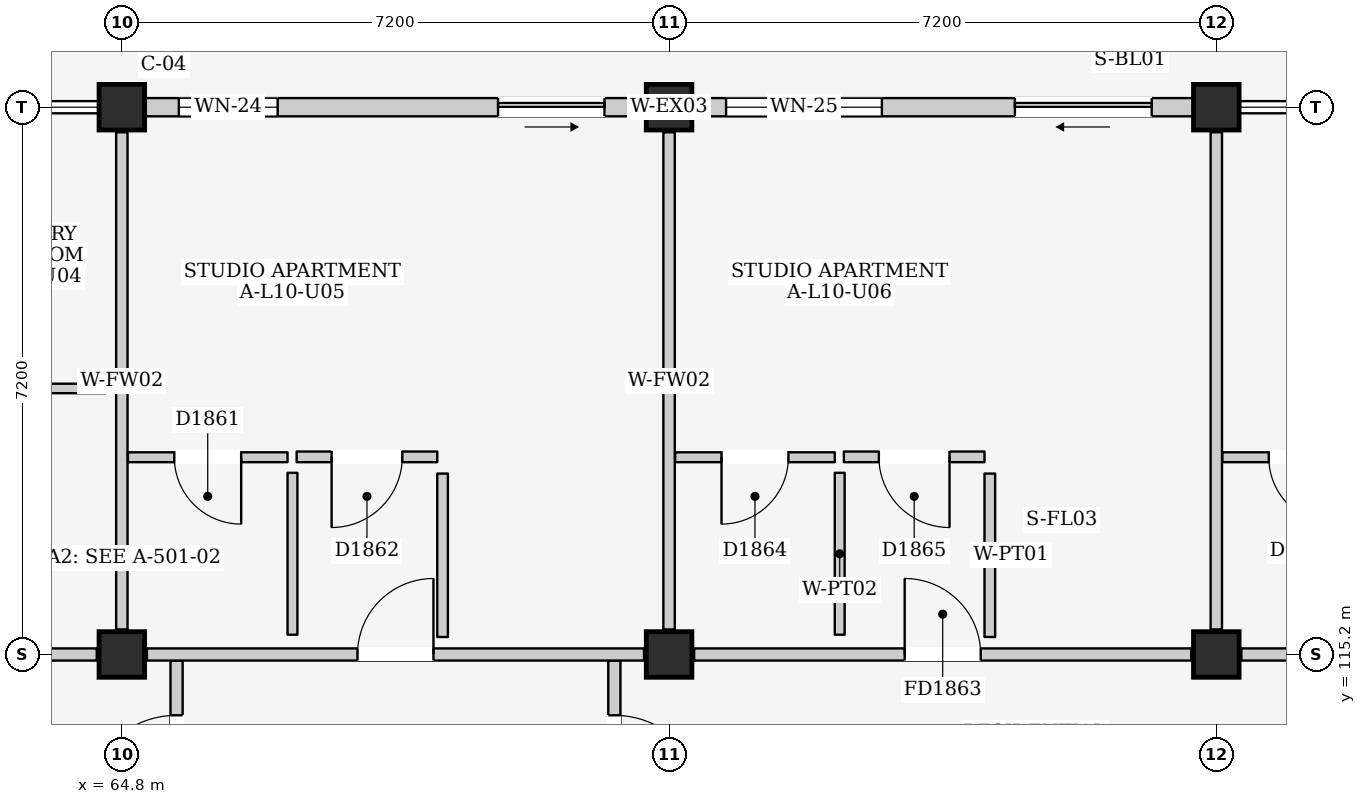
"""IFC4 building model, lengths in metres.
Left out: names, types, materials, properties, quantities, classifications, styles, units other than length and angle.
Written with IfcOpenShell. Run it as: python <this file> out.ifc"""

import sys

from ifc_helpers import new_model, si_unit, direction, frame, frame_2d, origin, origin_2d, place, context, subcontext, project, spatial, rectangle, extrude, element, fill, save


model = new_model("IFC4")
c1 = context("Model", 3, precision=1e-05, world=origin(), true_north=direction((0.0, 1.0)))
c2 = subcontext(c1, "Body", "Model", "MODEL_VIEW")
j1 = project(units=[si_unit("LENGTHUNIT", "METRE"), si_unit("PLANEANGLEUNIT", "RADIAN")], contexts=[c1])
p1 = place(None, origin())
s1 = spatial("IfcSite", under=j1, at=p1, CompositionType="ELEMENT")
p2 = place(p1, origin())
s2 = spatial("IfcBuilding", under=s1, at=p2, CompositionType="ELEMENT")
p3 = place(p2, frame((0.0, 0.0, 34.8)))
s3 = spatial("IfcBuildingStorey", under=s2, at=p3, CompositionType="ELEMENT", Elevation=34.8)
for number, where, z_axis, x_axis in (
    (1, (64.8, 115.2, 0.0), (0.0, 0.0, 1.0), (1.0, 0.0, 0.0)),
    (2, (64.8, 122.4, 0.0), (0.0, 0.0, 1.0), (1.0, 0.0, 0.0)),
    (3, (72.0, 115.2, 0.0), (0.0, 0.0, 1.0), (1.0, 0.0, 0.0)),
    (4, (72.0, 122.4, 0.0), (0.0, 0.0, 1.0), (1.0, 0.0, 0.0)),
    (5, (79.2, 115.2, 0.0), (0.0, 0.0, 1.0), (1.0, 0.0, 0.0)),
    (6, (79.2, 122.4, 0.0), (0.0, 0.0, 1.0), (1.0, 0.0, 0.0)),
):
    element("IfcColumn", number, at=place(p3, frame(where, z_axis=z_axis, x_axis=x_axis)), inside=s3, PredefinedType="COLUMN", context=c2, shape_type="SweptSolid", body=[
        extrude(rectangle(XDim=0.6, YDim=0.6, at=origin_2d()), origin(), (0.0, 0.0, 1.0), 3.2),
    ])
p4 = place(p3, frame((65.1, 122.4, 0.0), z_axis=(0.0, 0.0, 1.0), x_axis=(1.0, 0.0, 0.0)))
e7 = element("IfcWall", 7, at=p4, inside=s3, PredefinedType="ELEMENTEDWALL", context=c2, shape_type="SweptSolid", body=[
    extrude(rectangle(XDim=6.6, YDim=0.24, at=frame_2d((3.3, 0.0))), origin(), (0.0, 0.0, 1.0), 2.495),
])
p5 = place(p4, frame((4.65, 0.0, 0.0)))
e8 = element("IfcOpeningElement", 8, at=p5, cuts=e7, PredefinedType="OPENING", context=c2, shape_type="SweptSolid", body=[
    extrude(rectangle(XDim=1.4, YDim=2.1, at=frame_2d((0.7, 1.05))), frame((0.0, 0.135, 0.0), z_axis=(0.0, -1.0, 0.0), x_axis=(1.0, 0.0, 0.0)), (0.0, 0.0, 1.0), 0.27),
])
p6 = place(p4, frame((0.45, 0.0, 0.9)))
e9 = element("IfcOpeningElement", 9, at=p6, cuts=e7, PredefinedType="OPENING", context=c2, shape_type="SweptSolid", body=[
    extrude(rectangle(XDim=1.3, YDim=1.25, at=frame_2d((0.65, 0.625))), frame((0.0, 0.135, 0.0), z_axis=(0.0, -1.0, 0.0), x_axis=(1.0, 0.0, 0.0)), (0.0, 0.0, 1.0), 0.27),
])
p7 = place(p3, frame((72.3, 122.4, 0.0), z_axis=(0.0, 0.0, 1.0), x_axis=(1.0, 0.0, 0.0)))
e10 = element("IfcWall", 10, at=p7, inside=s3, PredefinedType="ELEMENTEDWALL", context=c2, shape_type="SweptSolid", body=[
    extrude(rectangle(XDim=6.6, YDim=0.24, at=frame_2d((3.3, 0.0))), origin(), (0.0, 0.0, 1.0), 2.495),
])
p8 = place(p7, frame((4.25, 0.0, 0.0)))
e11 = element("IfcOpeningElement", 11, at=p8, cuts=e10, PredefinedType="OPENING", context=c2, shape_type="SweptSolid", body=[
    extrude(rectangle(XDim=1.8, YDim=2.12, at=frame_2d((0.9, 1.06))), frame((0.0, 0.135, 0.0), z_axis=(0.0, -1.0, 0.0), x_axis=(1.0, 0.0, 0.0)), (0.0, 0.0, 1.0), 0.27),
])
p9 = place(p7, frame((0.45, 0.0, 0.785)))
e12 = element("IfcOpeningElement", 12, at=p9, cuts=e10, PredefinedType="OPENING", context=c2, shape_type="SweptSolid", body=[
    extrude(rectangle(XDim=2.05, YDim=1.6, at=frame_2d((1.025, 0.8))), frame((0.0, 0.135, 0.0), z_axis=(0.0, -1.0, 0.0), x_axis=(1.0, 0.0, 0.0)), (0.0, 0.0, 1.0), 0.27),
])
p10 = place(p3, frame((65.52, 110.8, 0.0), z_axis=(0.0, 0.0, 1.0), x_axis=(0.0, 1.0, 0.0)))
e13 = element("IfcWall", 13, at=p10, inside=s3, PredefinedType="PARTITIONING", context=c2, shape_type="SweptSolid", body=[
    extrude(rectangle(XDim=4.32, YDim=0.16, at=frame_2d((2.16, 0.0))), origin(), (0.0, 0.0, 1.0), 2.96),
])
p11 = place(p10, frame((2.4, 0.0, 0.0)))
e14 = element("IfcOpeningElement", 14, at=p11, cuts=e13, PredefinedType="OPENING", context=c2, shape_type="SweptSolid", body=[
    extrude(rectangle(XDim=1.2, YDim=2.2, at=frame_2d((0.6, 1.1))), frame((0.0, 0.095, 0.0), z_axis=(0.0, -1.0, 0.0), x_axis=(1.0, 0.0, 0.0)), (0.0, 0.0, 1.0), 0.19),
])
p12 = place(p3, frame((71.28, 110.8, 0.0), z_axis=(0.0, 0.0, 1.0), x_axis=(0.0, 1.0, 0.0)))
e15 = element("IfcWall", 15, at=p12, inside=s3, PredefinedType="PARTITIONING", context=c2, shape_type="SweptSolid", body=[
    extrude(rectangle(XDim=4.32, YDim=0.16, at=frame_2d((2.16, 0.0))), origin(), (0.0, 0.0, 1.0), 2.96),
])
p13 = place(p12, frame((2.4, 0.0, 0.0)))
e16 = element("IfcOpeningElement", 16, at=p13, cuts=e15, PredefinedType="OPENING", context=c2, shape_type="SweptSolid", body=[
    extrude(rectangle(XDim=1.2, YDim=2.2, at=frame_2d((0.6, 1.1))), frame((0.0, 0.095, 0.0), z_axis=(0.0, -1.0, 0.0), x_axis=(1.0, 0.0, 0.0)), (0.0, 0.0, 1.0), 0.19),
])
p14 = place(p3, frame((57.93, 115.2, 0.0), z_axis=(0.0, 0.0, 1.0), x_axis=(1.0, 0.0, 0.0)))
e17 = element("IfcWall", 17, at=p14, inside=s3, PredefinedType="PARTITIONING", context=c2, shape_type="SweptSolid", body=[
    extrude(rectangle(XDim=6.54, YDim=0.16, at=frame_2d((3.27, 0.0))), origin(), (0.0, 0.0, 1.0), 2.295),
])
p15 = place(p14, frame((2.77, 0.0, 0.0)))
e18 = element("IfcOpeningElement", 18, at=p15, cuts=e17, PredefinedType="OPENING", context=c2, shape_type="SweptSolid", body=[
    extrude(rectangle(XDim=1.0, YDim=2.15, at=frame_2d((0.5, 1.075))), frame((0.0, 0.095, 0.0), z_axis=(0.0, -1.0, 0.0), x_axis=(1.0, 0.0, 0.0)), (0.0, 0.0, 1.0), 0.19),
])
p16 = place(p3, frame((64.8, 115.53, 0.0), z_axis=(0.0, 0.0, 1.0), x_axis=(0.0, 1.0, 0.0)))
e19 = element("IfcWall", 19, at=p16, inside=s3, PredefinedType="PARTITIONING", context=c2, shape_type="SweptSolid", body=[
    extrude(rectangle(XDim=6.54, YDim=0.15, at=frame_2d((3.27, 0.0))), origin(), (0.0, 0.0, 1.0), 2.445),
])
p17 = place(p3, frame((61.52, 118.7, 0.0), z_axis=(0.0, 0.0, 1.0), x_axis=(1.0, 0.0, 0.0)))
e20 = element("IfcWall", 20, at=p17, inside=s3, PredefinedType="PARTITIONING", context=c2, shape_type="SweptSolid", body=[
    extrude(rectangle(XDim=3.06, YDim=0.125, at=frame_2d((1.53, 0.0))), origin(), (0.0, 0.0, 1.0), 2.96),
])
p18 = place(p3, frame((65.13, 115.2, 0.0), z_axis=(0.0, 0.0, 1.0), x_axis=(1.0, 0.0, 0.0)))
e21 = element("IfcWall", 21, at=p18, inside=s3, PredefinedType="PARTITIONING", context=c2, shape_type="SweptSolid", body=[
    extrude(rectangle(XDim=6.54, YDim=0.16, at=frame_2d((3.27, 0.0))), origin(), (0.0, 0.0, 1.0), 2.295),
])
p19 = place(p18, frame((2.77, 0.0, 0.0)))
e22 = element("IfcOpeningElement", 22, at=p19, cuts=e21, PredefinedType="OPENING", context=c2, shape_type="SweptSolid", body=[
    extrude(rectangle(XDim=1.0, YDim=2.15, at=frame_2d((0.5, 1.075))), frame((0.0, 0.095, 0.0), z_axis=(0.0, -1.0, 0.0), x_axis=(1.0, 0.0, 0.0)), (0.0, 0.0, 1.0), 0.19),
])
p20 = place(p3, frame((72.0, 115.53, 0.0), z_axis=(0.0, 0.0, 1.0), x_axis=(0.0, 1.0, 0.0)))
e23 = element("IfcWall", 23, at=p20, inside=s3, PredefinedType="PARTITIONING", context=c2, shape_type="SweptSolid", body=[
    extrude(rectangle(XDim=6.54, YDim=0.15, at=frame_2d((3.27, 0.0))), origin(), (0.0, 0.0, 1.0), 2.445),
])
p21 = place(p3, frame((64.88, 117.795, 0.0), z_axis=(0.0, 0.0, 1.0), x_axis=(1.0, 0.0, 0.0)))
e24 = element("IfcWall", 24, at=p21, inside=s3, PredefinedType="PARTITIONING", context=c2, shape_type="SweptSolid", body=[
    extrude(rectangle(XDim=2.1, YDim=0.13, at=frame_2d((1.05, 0.0))), origin(), (0.0, 0.0, 1.0), 2.96),
])
p22 = place(p21, frame((0.61, 0.0, 0.0)))
e25 = element("IfcOpeningElement", 25, at=p22, cuts=e24, PredefinedType="OPENING", context=c2, shape_type="SweptSolid", body=[
    extrude(rectangle(XDim=0.88, YDim=2.1, at=frame_2d((0.44, 1.05))), frame((0.0, 0.08, 0.0), z_axis=(0.0, -1.0, 0.0), x_axis=(1.0, 0.0, 0.0)), (0.0, 0.0, 1.0), 0.16),
])
p23 = place(p3, frame((67.045, 115.46, 0.0), z_axis=(0.0, 0.0, 1.0), x_axis=(0.0, 1.0, 0.0)))
e26 = element("IfcWall", 26, at=p23, inside=s3, PredefinedType="PARTITIONING", context=c2, shape_type="SweptSolid", body=[
    extrude(rectangle(XDim=2.13, YDim=0.13, at=frame_2d((1.065, 0.0))), origin(), (0.0, 0.0, 1.0), 2.96),
])
p24 = place(p3, frame((67.1, 117.8, 0.0), z_axis=(0.0, 0.0, 1.0), x_axis=(1.0, 0.0, 0.0)))
e27 = element("IfcWall", 27, at=p24, inside=s3, PredefinedType="PARTITIONING", context=c2, shape_type="SweptSolid", body=[
    extrude(rectangle(XDim=1.85, YDim=0.14, at=frame_2d((0.925, 0.0))), origin(), (0.0, 0.0, 1.0), 2.96),
])
p25 = place(p24, frame((0.46, 0.0, 0.0)))
e28 = element("IfcOpeningElement", 28, at=p25, cuts=e27, PredefinedType="OPENING", context=c2, shape_type="SweptSolid", body=[
    extrude(rectangle(XDim=0.93, YDim=2.14, at=frame_2d((0.465, 1.07))), frame((0.0, 0.085, 0.0), z_axis=(0.0, -1.0, 0.0), x_axis=(1.0, 0.0, 0.0)), (0.0, 0.0, 1.0), 0.17),
])
p26 = place(p3, frame((69.02, 115.43, 0.0), z_axis=(0.0, 0.0, 1.0), x_axis=(0.0, 1.0, 0.0)))
e29 = element("IfcWall", 29, at=p26, inside=s3, PredefinedType="PARTITIONING", context=c2, shape_type="SweptSolid", body=[
    extrude(rectangle(XDim=2.15, YDim=0.14, at=frame_2d((1.075, 0.0))), origin(), (0.0, 0.0, 1.0), 2.96),
])
p27 = place(p3, frame((72.33, 115.2, 0.0), z_axis=(0.0, 0.0, 1.0), x_axis=(1.0, 0.0, 0.0)))
e30 = element("IfcWall", 30, at=p27, inside=s3, PredefinedType="PARTITIONING", context=c2, shape_type="SweptSolid", body=[
    extrude(rectangle(XDim=6.54, YDim=0.16, at=frame_2d((3.27, 0.0))), origin(), (0.0, 0.0, 1.0), 2.295),
])
p28 = place(p27, frame((2.77, 0.0, 0.0)))
e31 = element("IfcOpeningElement", 31, at=p28, cuts=e30, PredefinedType="OPENING", context=c2, shape_type="SweptSolid", body=[
    extrude(rectangle(XDim=1.0, YDim=2.15, at=frame_2d((0.5, 1.075))), frame((0.0, 0.095, 0.0), z_axis=(0.0, -1.0, 0.0), x_axis=(1.0, 0.0, 0.0)), (0.0, 0.0, 1.0), 0.19),
])
p29 = place(p3, frame((79.2, 115.53, 0.0), z_axis=(0.0, 0.0, 1.0), x_axis=(0.0, 1.0, 0.0)))
e32 = element("IfcWall", 32, at=p29, inside=s3, PredefinedType="PARTITIONING", context=c2, shape_type="SweptSolid", body=[
    extrude(rectangle(XDim=6.54, YDim=0.15, at=frame_2d((3.27, 0.0))), origin(), (0.0, 0.0, 1.0), 2.445),
])
p30 = place(p3, frame((72.08, 117.795, 0.0), z_axis=(0.0, 0.0, 1.0), x_axis=(1.0, 0.0, 0.0)))
e33 = element("IfcWall", 33, at=p30, inside=s3, PredefinedType="PARTITIONING", context=c2, shape_type="SweptSolid", body=[
    extrude(rectangle(XDim=2.1, YDim=0.13, at=frame_2d((1.05, 0.0))), origin(), (0.0, 0.0, 1.0), 2.96),
])
p31 = place(p30, frame((0.61, 0.0, 0.0)))
e34 = element("IfcOpeningElement", 34, at=p31, cuts=e33, PredefinedType="OPENING", context=c2, shape_type="SweptSolid", body=[
    extrude(rectangle(XDim=0.88, YDim=2.1, at=frame_2d((0.44, 1.05))), frame((0.0, 0.08, 0.0), z_axis=(0.0, -1.0, 0.0), x_axis=(1.0, 0.0, 0.0)), (0.0, 0.0, 1.0), 0.16),
])
p32 = place(p3, frame((74.245, 115.46, 0.0), z_axis=(0.0, 0.0, 1.0), x_axis=(0.0, 1.0, 0.0)))
e35 = element("IfcWall", 35, at=p32, inside=s3, PredefinedType="PARTITIONING", context=c2, shape_type="SweptSolid", body=[
    extrude(rectangle(XDim=2.13, YDim=0.13, at=frame_2d((1.065, 0.0))), origin(), (0.0, 0.0, 1.0), 2.96),
])
p33 = place(p3, frame((74.3, 117.8, 0.0), z_axis=(0.0, 0.0, 1.0), x_axis=(1.0, 0.0, 0.0)))
e36 = element("IfcWall", 36, at=p33, inside=s3, PredefinedType="PARTITIONING", context=c2, shape_type="SweptSolid", body=[
    extrude(rectangle(XDim=1.85, YDim=0.14, at=frame_2d((0.925, 0.0))), origin(), (0.0, 0.0, 1.0), 2.96),
])
p34 = place(p33, frame((0.46, 0.0, 0.0)))
e37 = element("IfcOpeningElement", 37, at=p34, cuts=e36, PredefinedType="OPENING", context=c2, shape_type="SweptSolid", body=[
    extrude(rectangle(XDim=0.93, YDim=2.14, at=frame_2d((0.465, 1.07))), frame((0.0, 0.085, 0.0), z_axis=(0.0, -1.0, 0.0), x_axis=(1.0, 0.0, 0.0)), (0.0, 0.0, 1.0), 0.17),
])
p35 = place(p3, frame((76.22, 115.43, 0.0), z_axis=(0.0, 0.0, 1.0), x_axis=(0.0, 1.0, 0.0)))
e38 = element("IfcWall", 38, at=p35, inside=s3, PredefinedType="PARTITIONING", context=c2, shape_type="SweptSolid", body=[
    extrude(rectangle(XDim=2.15, YDim=0.14, at=frame_2d((1.075, 0.0))), origin(), (0.0, 0.0, 1.0), 2.96),
])
p36 = place(p3, frame((79.53, 115.2, 0.0), z_axis=(0.0, 0.0, 1.0), x_axis=(1.0, 0.0, 0.0)))
e39 = element("IfcWall", 39, at=p36, inside=s3, PredefinedType="PARTITIONING", context=c2, shape_type="SweptSolid", body=[
    extrude(rectangle(XDim=6.54, YDim=0.16, at=frame_2d((3.27, 0.0))), origin(), (0.0, 0.0, 1.0), 2.295),
])
p37 = place(p36, frame((2.77, 0.0, 0.0)))
e40 = element("IfcOpeningElement", 40, at=p37, cuts=e39, PredefinedType="OPENING", context=c2, shape_type="SweptSolid", body=[
    extrude(rectangle(XDim=1.0, YDim=2.15, at=frame_2d((0.5, 1.075))), frame((0.0, 0.095, 0.0), z_axis=(0.0, -1.0, 0.0), x_axis=(1.0, 0.0, 0.0)), (0.0, 0.0, 1.0), 0.19),
])
p38 = place(p3, frame((79.28, 117.795, 0.0), z_axis=(0.0, 0.0, 1.0), x_axis=(1.0, 0.0, 0.0)))
e41 = element("IfcWall", 41, at=p38, inside=s3, PredefinedType="PARTITIONING", context=c2, shape_type="SweptSolid", body=[
    extrude(rectangle(XDim=2.1, YDim=0.13, at=frame_2d((1.05, 0.0))), origin(), (0.0, 0.0, 1.0), 2.96),
])
p39 = place(p38, frame((0.61, 0.0, 0.0)))
e42 = element("IfcOpeningElement", 42, at=p39, cuts=e41, PredefinedType="OPENING", context=c2, shape_type="SweptSolid", body=[
    extrude(rectangle(XDim=0.88, YDim=2.1, at=frame_2d((0.44, 1.05))), frame((0.0, 0.08, 0.0), z_axis=(0.0, -1.0, 0.0), x_axis=(1.0, 0.0, 0.0)), (0.0, 0.0, 1.0), 0.16),
])
p40 = place(p5, frame((1.4, 0.0, 0.0), z_axis=(0.0, 0.0, 1.0), x_axis=(-1.0, 0.0, 0.0)))
e43 = element("IfcDoor", 43, at=p40, inside=s3, OperationType="SLIDING_TO_RIGHT", PredefinedType="DOOR", context=c2, shape_type="SweptSolid", body=[
    extrude(rectangle(XDim=1.4, YDim=2.1, at=frame_2d((0.7, 1.05))), frame((0.0, 0.025, 0.0), z_axis=(0.0, -1.0, 0.0), x_axis=(1.0, 0.0, 0.0)), (0.0, 0.0, 1.0), 0.05),
])
fill(e8, e43)
p41 = place(p6, origin())
e44 = element("IfcWindow", 44, at=p41, inside=s3, PartitioningType="SINGLE_PANEL", PredefinedType="WINDOW", context=c2, shape_type="SweptSolid", body=[
    extrude(rectangle(XDim=1.3, YDim=1.25, at=frame_2d((0.65, 0.625))), frame((0.0, 0.03, 0.0), z_axis=(0.0, -1.0, 0.0), x_axis=(1.0, 0.0, 0.0)), (0.0, 0.0, 1.0), 0.06),
])
fill(e9, e44)
p42 = place(p8, frame((1.8, 0.0, 0.0), z_axis=(0.0, 0.0, 1.0), x_axis=(-1.0, 0.0, 0.0)))
e45 = element("IfcDoor", 45, at=p42, inside=s3, OperationType="SLIDING_TO_LEFT", PredefinedType="DOOR", context=c2, shape_type="SweptSolid", body=[
    extrude(rectangle(XDim=1.8, YDim=2.12, at=frame_2d((0.9, 1.06))), frame((0.0, 0.025, 0.0), z_axis=(0.0, -1.0, 0.0), x_axis=(1.0, 0.0, 0.0)), (0.0, 0.0, 1.0), 0.05),
])
fill(e11, e45)
p43 = place(p9, origin())
e46 = element("IfcWindow", 46, at=p43, inside=s3, PartitioningType="DOUBLE_PANEL_VERTICAL", PredefinedType="WINDOW", context=c2, shape_type="SweptSolid", body=[
    extrude(rectangle(XDim=2.05, YDim=1.6, at=frame_2d((1.025, 0.8))), frame((0.0, 0.03, 0.0), z_axis=(0.0, -1.0, 0.0), x_axis=(1.0, 0.0, 0.0)), (0.0, 0.0, 1.0), 0.06),
])
fill(e12, e46)
p44 = place(p11, origin())
e47 = element("IfcDoor", 47, at=p44, inside=s3, OperationType="SINGLE_SWING_LEFT", PredefinedType="DOOR", context=c2, shape_type="SweptSolid", body=[
    extrude(rectangle(XDim=1.2, YDim=2.2, at=frame_2d((0.6, 1.1))), frame((0.0, 0.025, 0.0), z_axis=(0.0, -1.0, 0.0), x_axis=(1.0, 0.0, 0.0)), (0.0, 0.0, 1.0), 0.05),
])
fill(e14, e47)
p45 = place(p13, frame((1.2, 0.0, 0.0), z_axis=(0.0, 0.0, 1.0), x_axis=(-1.0, 0.0, 0.0)))
e48 = element("IfcDoor", 48, at=p45, inside=s3, OperationType="SINGLE_SWING_RIGHT", PredefinedType="DOOR", context=c2, shape_type="SweptSolid", body=[
    extrude(rectangle(XDim=1.2, YDim=2.2, at=frame_2d((0.6, 1.1))), frame((0.0, 0.025, 0.0), z_axis=(0.0, -1.0, 0.0), x_axis=(1.0, 0.0, 0.0)), (0.0, 0.0, 1.0), 0.05),
])
fill(e16, e48)
p46 = place(p19, origin())
e49 = element("IfcDoor", 49, at=p46, inside=s3, OperationType="SINGLE_SWING_RIGHT", PredefinedType="DOOR", context=c2, shape_type="SweptSolid", body=[
    extrude(rectangle(XDim=1.0, YDim=2.15, at=frame_2d((0.5, 1.075))), frame((0.0, 0.025, 0.0), z_axis=(0.0, -1.0, 0.0), x_axis=(1.0, 0.0, 0.0)), (0.0, 0.0, 1.0), 0.05),
])
fill(e22, e49)
p47 = place(p22, frame((0.88, 0.0, 0.0), z_axis=(0.0, 0.0, 1.0), x_axis=(-1.0, 0.0, 0.0)))
e50 = element("IfcDoor", 50, at=p47, inside=s3, OperationType="SINGLE_SWING_LEFT", PredefinedType="DOOR", context=c2, shape_type="SweptSolid", body=[
    extrude(rectangle(XDim=0.88, YDim=2.1, at=frame_2d((0.44, 1.05))), frame((0.0, 0.025, 0.0), z_axis=(0.0, -1.0, 0.0), x_axis=(1.0, 0.0, 0.0)), (0.0, 0.0, 1.0), 0.05),
])
fill(e25, e50)
p48 = place(p25, frame((0.93, 0.0, 0.0), z_axis=(0.0, 0.0, 1.0), x_axis=(-1.0, 0.0, 0.0)))
e51 = element("IfcDoor", 51, at=p48, inside=s3, OperationType="SINGLE_SWING_RIGHT", PredefinedType="DOOR", context=c2, shape_type="SweptSolid", body=[
    extrude(rectangle(XDim=0.93, YDim=2.14, at=frame_2d((0.465, 1.07))), frame((0.0, 0.025, 0.0), z_axis=(0.0, -1.0, 0.0), x_axis=(1.0, 0.0, 0.0)), (0.0, 0.0, 1.0), 0.05),
])
fill(e28, e51)
p49 = place(p28, origin())
e52 = element("IfcDoor", 52, at=p49, inside=s3, OperationType="SINGLE_SWING_LEFT", PredefinedType="DOOR", context=c2, shape_type="SweptSolid", body=[
    extrude(rectangle(XDim=1.0, YDim=2.15, at=frame_2d((0.5, 1.075))), frame((0.0, 0.025, 0.0), z_axis=(0.0, -1.0, 0.0), x_axis=(1.0, 0.0, 0.0)), (0.0, 0.0, 1.0), 0.05),
])
fill(e31, e52)
p50 = place(p31, frame((0.88, 0.0, 0.0), z_axis=(0.0, 0.0, 1.0), x_axis=(-1.0, 0.0, 0.0)))
e53 = element("IfcDoor", 53, at=p50, inside=s3, OperationType="SINGLE_SWING_RIGHT", PredefinedType="DOOR", context=c2, shape_type="SweptSolid", body=[
    extrude(rectangle(XDim=0.88, YDim=2.1, at=frame_2d((0.44, 1.05))), frame((0.0, 0.025, 0.0), z_axis=(0.0, -1.0, 0.0), x_axis=(1.0, 0.0, 0.0)), (0.0, 0.0, 1.0), 0.05),
])
fill(e34, e53)
p51 = place(p34, frame((0.93, 0.0, 0.0), z_axis=(0.0, 0.0, 1.0), x_axis=(-1.0, 0.0, 0.0)))
e54 = element("IfcDoor", 54, at=p51, inside=s3, OperationType="SINGLE_SWING_LEFT", PredefinedType="DOOR", context=c2, shape_type="SweptSolid", body=[
    extrude(rectangle(XDim=0.93, YDim=2.14, at=frame_2d((0.465, 1.07))), frame((0.0, 0.025, 0.0), z_axis=(0.0, -1.0, 0.0), x_axis=(1.0, 0.0, 0.0)), (0.0, 0.0, 1.0), 0.05),
])
fill(e37, e54)
p52 = place(p39, frame((0.88, 0.0, 0.0), z_axis=(0.0, 0.0, 1.0), x_axis=(-1.0, 0.0, 0.0)))
e55 = element("IfcDoor", 55, at=p52, inside=s3, OperationType="SINGLE_SWING_LEFT", PredefinedType="DOOR", context=c2, shape_type="SweptSolid", body=[
    extrude(rectangle(XDim=0.88, YDim=2.1, at=frame_2d((0.44, 1.05))), frame((0.0, 0.025, 0.0), z_axis=(0.0, -1.0, 0.0), x_axis=(1.0, 0.0, 0.0)), (0.0, 0.0, 1.0), 0.05),
])
fill(e42, e55)
save(model, sys.argv[1])
